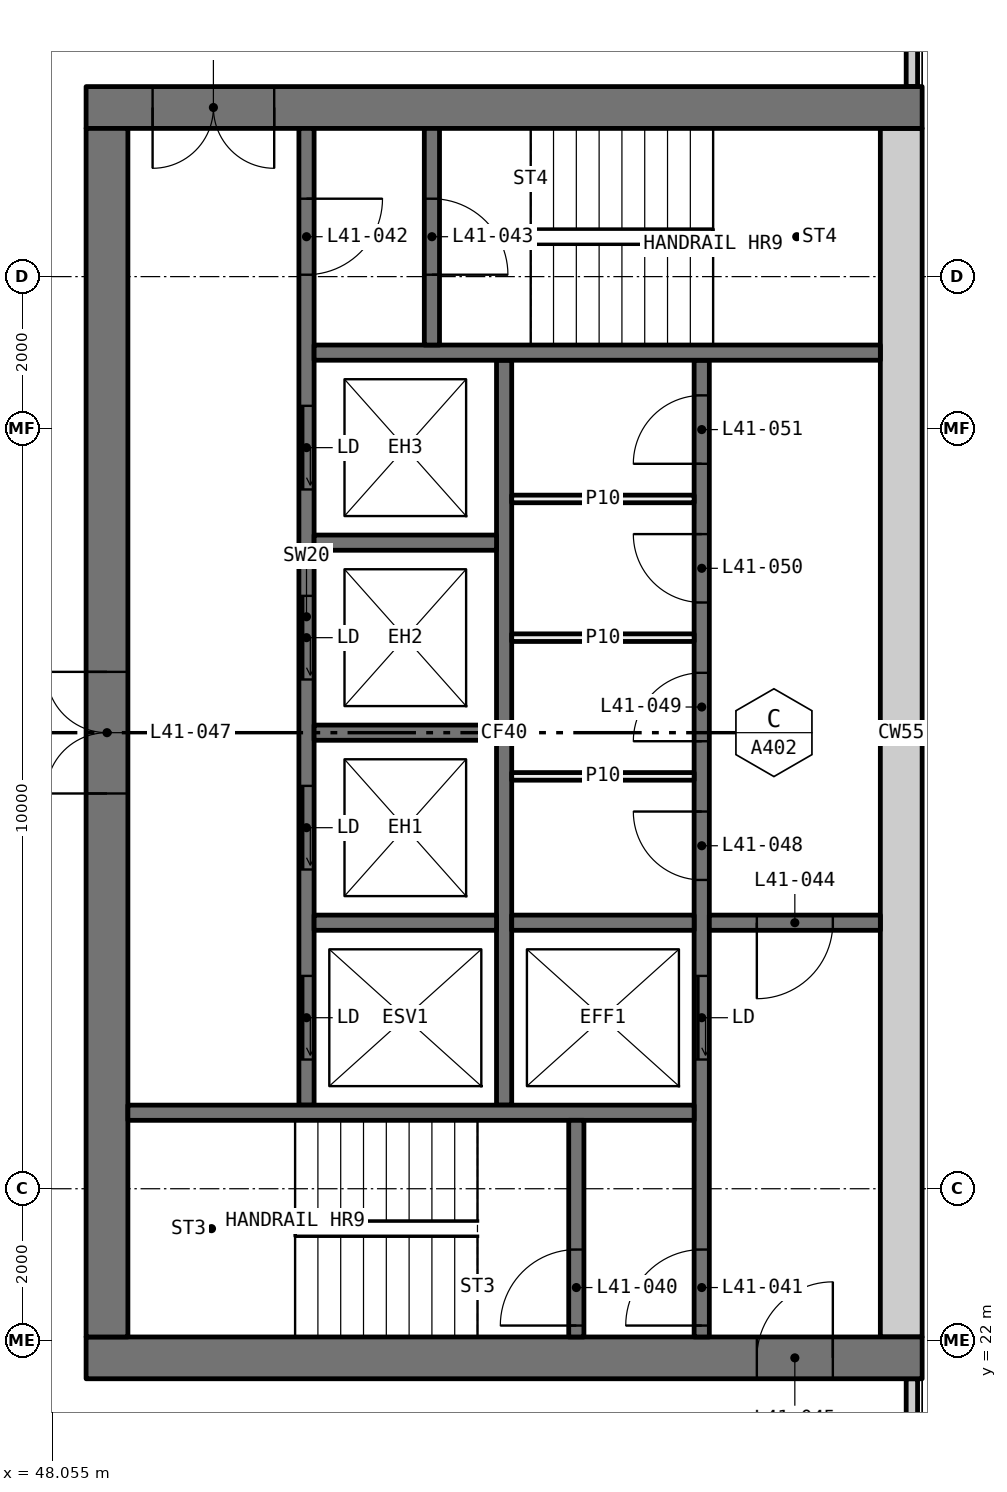
"""IFC4 building model, lengths in metres.
Left out: names, types, materials, properties, quantities, classifications, styles, units other than length and angle.
Written with IfcOpenShell. Run it as: python <this file> out.ifc"""

import sys

from ifc_helpers import new_model, si_unit, direction, frame, frame_2d, origin, place, context, subcontext, project, spatial, rectangle, extrude, element, fill, save


model = new_model("IFC4")
c1 = context("Model", 3, precision=1e-05, world=origin(), true_north=direction((0.0, 1.0)))
c2 = subcontext(c1, "Body", "Model", "MODEL_VIEW")
j1 = project(units=[si_unit("LENGTHUNIT", "METRE"), si_unit("PLANEANGLEUNIT", "RADIAN")], contexts=[c1])
p1 = place(None, origin())
s1 = spatial("IfcSite", under=j1, at=p1, CompositionType="ELEMENT")
p2 = place(p1, origin())
s2 = spatial("IfcBuilding", under=s1, at=p2, CompositionType="ELEMENT")
p3 = place(p2, frame((0.0, 0.0, 158.25)))
s3 = spatial("IfcBuildingStorey", under=s2, at=p3, CompositionType="ELEMENT", Elevation=158.25)
for number, where, z_axis, x_axis in (
    (1, (59.365, 18.71, 0.0), (0.0, 0.0, 1.0), (0.0, 1.0, 0.0)),
    (2, (59.365, 38.5, 0.0), (0.0, 0.0, 1.0), (0.0, 1.0, 0.0)),
):
    element("IfcWall", number, at=place(p3, frame(where, z_axis=z_axis, x_axis=x_axis)), inside=s3, PredefinedType="ELEMENTEDWALL", context=c2, shape_type="SweptSolid", body=[
        extrude(rectangle(XDim=2.79, YDim=0.15, at=frame_2d((1.395, 0.0))), origin(), (0.0, 0.0, 1.0), 3.05),
    ])
p4 = place(p3, frame((59.5, 21.775, 0.0), z_axis=(0.0, 0.0, 1.0), x_axis=(-1.0, 0.0, 0.0)))
e3 = element("IfcWall", 3, at=p4, inside=s3, PredefinedType="SHEAR", context=c2, shape_type="SweptSolid", body=[
    extrude(rectangle(XDim=11.0, YDim=0.55, at=frame_2d((5.5, 0.0))), origin(), (0.0, 0.0, 1.0), 3.05),
])
p5 = place(p4, frame((1.175, 0.0, 0.0)))
e4 = element("IfcOpeningElement", 4, at=p5, cuts=e3, PredefinedType="OPENING", context=c2, shape_type="SweptSolid", body=[
    extrude(rectangle(XDim=1.0, YDim=2.1, at=frame_2d((0.5, 1.05))), frame((0.0, 0.285, 0.0), z_axis=(0.0, -1.0, 0.0), x_axis=(1.0, 0.0, 0.0)), (0.0, 0.0, 1.0), 0.57),
])
p6 = place(p3, frame((59.5, 38.225, 0.0), z_axis=(0.0, 0.0, 1.0), x_axis=(-1.0, 0.0, 0.0)))
e5 = element("IfcWall", 5, at=p6, inside=s3, PredefinedType="SHEAR", context=c2, shape_type="SweptSolid", body=[
    extrude(rectangle(XDim=11.0, YDim=0.55, at=frame_2d((5.5, 0.0))), origin(), (0.0, 0.0, 1.0), 3.05),
])
p7 = place(p6, frame((8.525, 0.0, 0.0)))
e6 = element("IfcOpeningElement", 6, at=p7, cuts=e5, PredefinedType="OPENING", context=c2, shape_type="SweptSolid", body=[
    extrude(rectangle(XDim=1.6, YDim=2.1, at=frame_2d((0.8, 1.05))), frame((0.0, 0.285, 0.0), z_axis=(0.0, -1.0, 0.0), x_axis=(1.0, 0.0, 0.0)), (0.0, 0.0, 1.0), 0.57),
])
p8 = place(p3, frame((59.225, 22.05, 0.0), z_axis=(0.0, 0.0, 1.0), x_axis=(0.0, 1.0, 0.0)))
e7 = element("IfcWall", 7, at=p8, inside=s3, PredefinedType="SHEAR", context=c2, shape_type="SweptSolid", body=[
    extrude(rectangle(XDim=15.9, YDim=0.55, at=frame_2d((7.95, 0.0))), origin(), (0.0, 0.0, 1.0), 3.05),
])
p9 = place(p3, frame((48.775, 22.05, 0.0), z_axis=(0.0, 0.0, 1.0), x_axis=(0.0, 1.0, 0.0)))
e8 = element("IfcWall", 8, at=p9, inside=s3, PredefinedType="SHEAR", context=c2, shape_type="SweptSolid", body=[
    extrude(rectangle(XDim=15.9, YDim=0.55, at=frame_2d((7.95, 0.0))), origin(), (0.0, 0.0, 1.0), 3.05),
])
p10 = place(p9, frame((7.15, 0.0, 0.0)))
e9 = element("IfcOpeningElement", 9, at=p10, cuts=e8, PredefinedType="OPENING", context=c2, shape_type="SweptSolid", body=[
    extrude(rectangle(XDim=1.6, YDim=2.1, at=frame_2d((0.8, 1.05))), frame((0.0, 0.285, 0.0), z_axis=(0.0, -1.0, 0.0), x_axis=(1.0, 0.0, 0.0)), (0.0, 0.0, 1.0), 0.57),
])
p11 = place(p3, frame((56.6, 22.05, 0.0), z_axis=(0.0, 0.0, 1.0), x_axis=(0.0, 1.0, 0.0)))
e10 = element("IfcWall", 10, at=p11, inside=s3, PredefinedType="SOLIDWALL", context=c2, shape_type="SweptSolid", body=[
    extrude(rectangle(XDim=12.85, YDim=0.2, at=frame_2d((6.425, 0.0))), origin(), (0.0, 0.0, 1.0), 3.05),
])
p12 = place(p11, frame((3.65, 0.0, 0.0)))
e11 = element("IfcOpeningElement", 11, at=p12, cuts=e10, PredefinedType="OPENING", context=c2, shape_type="SweptSolid", body=[
    extrude(rectangle(XDim=1.1, YDim=2.1, at=frame_2d((0.55, 1.05))), frame((0.0, 0.11, 0.0), z_axis=(0.0, -1.0, 0.0), x_axis=(1.0, 0.0, 0.0)), (0.0, 0.0, 1.0), 0.22),
])
p13 = place(p11, frame((0.15, 0.0, 0.0)))
e12 = element("IfcOpeningElement", 12, at=p13, cuts=e10, PredefinedType="OPENING", context=c2, shape_type="SweptSolid", body=[
    extrude(rectangle(XDim=1.0, YDim=2.1, at=frame_2d((0.5, 1.05))), frame((0.0, 0.11, 0.0), z_axis=(0.0, -1.0, 0.0), x_axis=(1.0, 0.0, 0.0)), (0.0, 0.0, 1.0), 0.22),
])
p14 = place(p11, frame((6.012, 0.0, 0.0)))
e13 = element("IfcOpeningElement", 13, at=p14, cuts=e10, PredefinedType="OPENING", context=c2, shape_type="SweptSolid", body=[
    extrude(rectangle(XDim=0.9, YDim=2.1, at=frame_2d((0.45, 1.05))), frame((0.0, 0.11, 0.0), z_axis=(0.0, -1.0, 0.0), x_axis=(1.0, 0.0, 0.0)), (0.0, 0.0, 1.0), 0.22),
])
p15 = place(p11, frame((7.837, 0.0, 0.0)))
e14 = element("IfcOpeningElement", 14, at=p15, cuts=e10, PredefinedType="OPENING", context=c2, shape_type="SweptSolid", body=[
    extrude(rectangle(XDim=0.9, YDim=2.1, at=frame_2d((0.45, 1.05))), frame((0.0, 0.11, 0.0), z_axis=(0.0, -1.0, 0.0), x_axis=(1.0, 0.0, 0.0)), (0.0, 0.0, 1.0), 0.22),
])
p16 = place(p11, frame((9.663, 0.0, 0.0)))
e15 = element("IfcOpeningElement", 15, at=p16, cuts=e10, PredefinedType="OPENING", context=c2, shape_type="SweptSolid", body=[
    extrude(rectangle(XDim=0.9, YDim=2.1, at=frame_2d((0.45, 1.05))), frame((0.0, 0.11, 0.0), z_axis=(0.0, -1.0, 0.0), x_axis=(1.0, 0.0, 0.0)), (0.0, 0.0, 1.0), 0.22),
])
p17 = place(p11, frame((11.488, 0.0, 0.0)))
e16 = element("IfcOpeningElement", 16, at=p17, cuts=e10, PredefinedType="OPENING", context=c2, shape_type="SweptSolid", body=[
    extrude(rectangle(XDim=0.9, YDim=2.1, at=frame_2d((0.45, 1.05))), frame((0.0, 0.11, 0.0), z_axis=(0.0, -1.0, 0.0), x_axis=(1.0, 0.0, 0.0)), (0.0, 0.0, 1.0), 0.22),
])
p18 = place(p3, frame((51.4, 25.1, 0.0), z_axis=(0.0, 0.0, 1.0), x_axis=(0.0, 1.0, 0.0)))
e17 = element("IfcWall", 17, at=p18, inside=s3, PredefinedType="SOLIDWALL", context=c2, shape_type="SweptSolid", body=[
    extrude(rectangle(XDim=12.85, YDim=0.2, at=frame_2d((6.425, 0.0))), origin(), (0.0, 0.0, 1.0), 3.05),
])
p19 = place(p18, frame((0.6, 0.0, 0.0)))
e18 = element("IfcOpeningElement", 18, at=p19, cuts=e17, PredefinedType="OPENING", context=c2, shape_type="SweptSolid", body=[
    extrude(rectangle(XDim=1.1, YDim=2.1, at=frame_2d((0.55, 1.05))), frame((0.0, 0.11, 0.0), z_axis=(0.0, -1.0, 0.0), x_axis=(1.0, 0.0, 0.0)), (0.0, 0.0, 1.0), 0.22),
])
p20 = place(p18, frame((3.1, 0.0, 0.0)))
e19 = element("IfcOpeningElement", 19, at=p20, cuts=e17, PredefinedType="OPENING", context=c2, shape_type="SweptSolid", body=[
    extrude(rectangle(XDim=1.1, YDim=2.1, at=frame_2d((0.55, 1.05))), frame((0.0, 0.11, 0.0), z_axis=(0.0, -1.0, 0.0), x_axis=(1.0, 0.0, 0.0)), (0.0, 0.0, 1.0), 0.22),
])
p21 = place(p18, frame((5.6, 0.0, 0.0)))
e20 = element("IfcOpeningElement", 20, at=p21, cuts=e17, PredefinedType="OPENING", context=c2, shape_type="SweptSolid", body=[
    extrude(rectangle(XDim=1.1, YDim=2.1, at=frame_2d((0.55, 1.05))), frame((0.0, 0.11, 0.0), z_axis=(0.0, -1.0, 0.0), x_axis=(1.0, 0.0, 0.0)), (0.0, 0.0, 1.0), 0.22),
])
p22 = place(p18, frame((8.1, 0.0, 0.0)))
e21 = element("IfcOpeningElement", 21, at=p22, cuts=e17, PredefinedType="OPENING", context=c2, shape_type="SweptSolid", body=[
    extrude(rectangle(XDim=1.1, YDim=2.1, at=frame_2d((0.55, 1.05))), frame((0.0, 0.11, 0.0), z_axis=(0.0, -1.0, 0.0), x_axis=(1.0, 0.0, 0.0)), (0.0, 0.0, 1.0), 0.22),
])
p23 = place(p18, frame((10.925, 0.0, 0.0)))
e22 = element("IfcOpeningElement", 22, at=p23, cuts=e17, PredefinedType="OPENING", context=c2, shape_type="SweptSolid", body=[
    extrude(rectangle(XDim=1.0, YDim=2.1, at=frame_2d((0.5, 1.05))), frame((0.0, 0.11, 0.0), z_axis=(0.0, -1.0, 0.0), x_axis=(1.0, 0.0, 0.0)), (0.0, 0.0, 1.0), 0.22),
])
p24 = place(p3, frame((54.0, 25.1, 0.0), z_axis=(0.0, 0.0, 1.0), x_axis=(0.0, 1.0, 0.0)))
e23 = element("IfcWall", 23, at=p24, inside=s3, PredefinedType="SOLIDWALL", context=c2, shape_type="SweptSolid", body=[
    extrude(rectangle(XDim=9.8, YDim=0.2, at=frame_2d((4.9, 0.0))), origin(), (0.0, 0.0, 1.0), 3.05),
])
for number, where, z_axis, x_axis in (
    (24, (56.5, 25.0, 0.0), (0.0, 0.0, 1.0), (-1.0, 0.0, 0.0)),
    (25, (58.95, 35.0, 0.0), (0.0, 0.0, 1.0), (-1.0, 0.0, 0.0)),
):
    element("IfcWall", number, at=place(p3, frame(where, z_axis=z_axis, x_axis=x_axis)), inside=s3, PredefinedType="SOLIDWALL", context=c2, shape_type="SweptSolid", body=[
        extrude(rectangle(XDim=7.45, YDim=0.2, at=frame_2d((3.725, 0.0))), origin(), (0.0, 0.0, 1.0), 3.05),
    ])
p25 = place(p3, frame((58.95, 27.5, 0.0), z_axis=(0.0, 0.0, 1.0), x_axis=(-1.0, 0.0, 0.0)))
e26 = element("IfcWall", 26, at=p25, inside=s3, PredefinedType="SOLIDWALL", context=c2, shape_type="SweptSolid", body=[
    extrude(rectangle(XDim=2.25, YDim=0.2, at=frame_2d((1.125, 0.0))), origin(), (0.0, 0.0, 1.0), 3.05),
])
p26 = place(p25, frame((0.625, 0.0, 0.0)))
e27 = element("IfcOpeningElement", 27, at=p26, cuts=e26, PredefinedType="OPENING", context=c2, shape_type="SweptSolid", body=[
    extrude(rectangle(XDim=1.0, YDim=2.1, at=frame_2d((0.5, 1.05))), frame((0.0, 0.11, 0.0), z_axis=(0.0, -1.0, 0.0), x_axis=(1.0, 0.0, 0.0)), (0.0, 0.0, 1.0), 0.22),
])
p27 = place(p3, frame((54.95, 22.05, 0.0), z_axis=(0.0, 0.0, 1.0), x_axis=(0.0, 1.0, 0.0)))
e28 = element("IfcWall", 28, at=p27, inside=s3, PredefinedType="SOLIDWALL", context=c2, shape_type="SweptSolid", body=[
    extrude(rectangle(XDim=2.85, YDim=0.2, at=frame_2d((1.425, 0.0))), origin(), (0.0, 0.0, 1.0), 3.05),
])
p28 = place(p27, frame((0.15, 0.0, 0.0)))
e29 = element("IfcOpeningElement", 29, at=p28, cuts=e28, PredefinedType="OPENING", context=c2, shape_type="SweptSolid", body=[
    extrude(rectangle(XDim=1.0, YDim=2.1, at=frame_2d((0.5, 1.05))), frame((0.0, 0.11, 0.0), z_axis=(0.0, -1.0, 0.0), x_axis=(1.0, 0.0, 0.0)), (0.0, 0.0, 1.0), 0.22),
])
p29 = place(p3, frame((53.05, 35.1, 0.0), z_axis=(0.0, 0.0, 1.0), x_axis=(0.0, 1.0, 0.0)))
e30 = element("IfcWall", 30, at=p29, inside=s3, PredefinedType="SOLIDWALL", context=c2, shape_type="SweptSolid", body=[
    extrude(rectangle(XDim=2.85, YDim=0.2, at=frame_2d((1.425, 0.0))), origin(), (0.0, 0.0, 1.0), 3.05),
])
p30 = place(p29, frame((0.925, 0.0, 0.0)))
e31 = element("IfcOpeningElement", 31, at=p30, cuts=e30, PredefinedType="OPENING", context=c2, shape_type="SweptSolid", body=[
    extrude(rectangle(XDim=1.0, YDim=2.1, at=frame_2d((0.5, 1.05))), frame((0.0, 0.11, 0.0), z_axis=(0.0, -1.0, 0.0), x_axis=(1.0, 0.0, 0.0)), (0.0, 0.0, 1.0), 0.22),
])
for number, where, z_axis, x_axis in (
    (32, (56.5, 27.5, 0.0), (0.0, 0.0, 1.0), (-1.0, 0.0, 0.0)),
    (33, (53.9, 27.5, 0.0), (0.0, 0.0, 1.0), (-1.0, 0.0, 0.0)),
    (34, (53.9, 30.0, 0.0), (0.0, 0.0, 1.0), (-1.0, 0.0, 0.0)),
    (35, (53.9, 32.5, 0.0), (0.0, 0.0, 1.0), (-1.0, 0.0, 0.0)),
):
    element("IfcWall", number, at=place(p3, frame(where, z_axis=z_axis, x_axis=x_axis)), inside=s3, PredefinedType="SOLIDWALL", context=c2, shape_type="SweptSolid", body=[
        extrude(rectangle(XDim=2.4, YDim=0.2, at=frame_2d((1.2, 0.0))), origin(), (0.0, 0.0, 1.0), 3.05),
    ])
for number, where, z_axis, x_axis in (
    (36, (56.5, 29.425, 0.0), (0.0, 0.0, 1.0), (-1.0, 0.0, 0.0)),
    (37, (56.5, 31.25, 0.0), (0.0, 0.0, 1.0), (-1.0, 0.0, 0.0)),
    (38, (56.5, 33.075, 0.0), (0.0, 0.0, 1.0), (-1.0, 0.0, 0.0)),
):
    element("IfcWall", number, at=place(p3, frame(where, z_axis=z_axis, x_axis=x_axis)), inside=s3, PredefinedType="PARTITIONING", context=c2, shape_type="SweptSolid", body=[
        extrude(rectangle(XDim=2.4, YDim=0.1, at=frame_2d((1.2, 0.0))), origin(), (0.0, 0.0, 1.0), 3.05),
    ])
p31 = place(p19, origin())
e39 = element("IfcDoor", 39, at=p31, inside=s3, OperationType="SLIDING_TO_LEFT", PredefinedType="DOOR", context=c2, shape_type="SweptSolid", body=[
    extrude(rectangle(XDim=1.1, YDim=2.1, at=frame_2d((0.55, 1.05))), frame((0.0, 0.025, 0.0), z_axis=(0.0, -1.0, 0.0), x_axis=(1.0, 0.0, 0.0)), (0.0, 0.0, 1.0), 0.05),
])
fill(e18, e39)
p32 = place(p20, origin())
e40 = element("IfcDoor", 40, at=p32, inside=s3, OperationType="SLIDING_TO_LEFT", PredefinedType="DOOR", context=c2, shape_type="SweptSolid", body=[
    extrude(rectangle(XDim=1.1, YDim=2.1, at=frame_2d((0.55, 1.05))), frame((0.0, 0.025, 0.0), z_axis=(0.0, -1.0, 0.0), x_axis=(1.0, 0.0, 0.0)), (0.0, 0.0, 1.0), 0.05),
])
fill(e19, e40)
p33 = place(p21, origin())
e41 = element("IfcDoor", 41, at=p33, inside=s3, OperationType="SLIDING_TO_LEFT", PredefinedType="DOOR", context=c2, shape_type="SweptSolid", body=[
    extrude(rectangle(XDim=1.1, YDim=2.1, at=frame_2d((0.55, 1.05))), frame((0.0, 0.025, 0.0), z_axis=(0.0, -1.0, 0.0), x_axis=(1.0, 0.0, 0.0)), (0.0, 0.0, 1.0), 0.05),
])
fill(e20, e41)
p34 = place(p22, origin())
e42 = element("IfcDoor", 42, at=p34, inside=s3, OperationType="SLIDING_TO_LEFT", PredefinedType="DOOR", context=c2, shape_type="SweptSolid", body=[
    extrude(rectangle(XDim=1.1, YDim=2.1, at=frame_2d((0.55, 1.05))), frame((0.0, 0.025, 0.0), z_axis=(0.0, -1.0, 0.0), x_axis=(1.0, 0.0, 0.0)), (0.0, 0.0, 1.0), 0.05),
])
fill(e21, e42)
p35 = place(p12, origin())
e43 = element("IfcDoor", 43, at=p35, inside=s3, OperationType="SLIDING_TO_LEFT", PredefinedType="DOOR", context=c2, shape_type="SweptSolid", body=[
    extrude(rectangle(XDim=1.1, YDim=2.1, at=frame_2d((0.55, 1.05))), frame((0.0, 0.025, 0.0), z_axis=(0.0, -1.0, 0.0), x_axis=(1.0, 0.0, 0.0)), (0.0, 0.0, 1.0), 0.05),
])
fill(e11, e43)
p36 = place(p28, origin())
e44 = element("IfcDoor", 44, at=p36, inside=s3, OperationType="SINGLE_SWING_RIGHT", PredefinedType="DOOR", context=c2, shape_type="SweptSolid", body=[
    extrude(rectangle(XDim=1.0, YDim=2.1, at=frame_2d((0.5, 1.05))), frame((0.0, 0.025, 0.0), z_axis=(0.0, -1.0, 0.0), x_axis=(1.0, 0.0, 0.0)), (0.0, 0.0, 1.0), 0.05),
])
fill(e29, e44)
p37 = place(p13, origin())
e45 = element("IfcDoor", 45, at=p37, inside=s3, OperationType="SINGLE_SWING_RIGHT", PredefinedType="DOOR", context=c2, shape_type="SweptSolid", body=[
    extrude(rectangle(XDim=1.0, YDim=2.1, at=frame_2d((0.5, 1.05))), frame((0.0, 0.025, 0.0), z_axis=(0.0, -1.0, 0.0), x_axis=(1.0, 0.0, 0.0)), (0.0, 0.0, 1.0), 0.05),
])
fill(e12, e45)
p38 = place(p23, frame((1.0, 0.0, 0.0), x_axis=(-1.0, 0.0, 0.0)))
e46 = element("IfcDoor", 46, at=p38, inside=s3, OperationType="SINGLE_SWING_RIGHT", PredefinedType="DOOR", context=c2, shape_type="SweptSolid", body=[
    extrude(rectangle(XDim=1.0, YDim=2.1, at=frame_2d((0.5, 1.05))), frame((0.0, 0.025, 0.0), z_axis=(0.0, -1.0, 0.0), x_axis=(1.0, 0.0, 0.0)), (0.0, 0.0, 1.0), 0.05),
])
fill(e22, e46)
p39 = place(p30, frame((1.0, 0.0, 0.0), x_axis=(-1.0, 0.0, 0.0)))
e47 = element("IfcDoor", 47, at=p39, inside=s3, OperationType="SINGLE_SWING_LEFT", PredefinedType="DOOR", context=c2, shape_type="SweptSolid", body=[
    extrude(rectangle(XDim=1.0, YDim=2.1, at=frame_2d((0.5, 1.05))), frame((0.0, 0.025, 0.0), z_axis=(0.0, -1.0, 0.0), x_axis=(1.0, 0.0, 0.0)), (0.0, 0.0, 1.0), 0.05),
])
fill(e31, e47)
p40 = place(p26, origin())
e48 = element("IfcDoor", 48, at=p40, inside=s3, OperationType="SINGLE_SWING_LEFT", PredefinedType="DOOR", context=c2, shape_type="SweptSolid", body=[
    extrude(rectangle(XDim=1.0, YDim=2.1, at=frame_2d((0.5, 1.05))), frame((0.0, 0.025, 0.0), z_axis=(0.0, -1.0, 0.0), x_axis=(1.0, 0.0, 0.0)), (0.0, 0.0, 1.0), 0.05),
])
fill(e27, e48)
p41 = place(p5, frame((1.0, 0.0, 0.0), x_axis=(-1.0, 0.0, 0.0)))
e49 = element("IfcDoor", 49, at=p41, inside=s3, OperationType="SINGLE_SWING_LEFT", PredefinedType="DOOR", context=c2, shape_type="SweptSolid", body=[
    extrude(rectangle(XDim=1.0, YDim=2.1, at=frame_2d((0.5, 1.05))), frame((0.0, 0.025, 0.0), z_axis=(0.0, -1.0, 0.0), x_axis=(1.0, 0.0, 0.0)), (0.0, 0.0, 1.0), 0.05),
])
fill(e4, e49)
p42 = place(p7, origin())
e50 = element("IfcDoor", 50, at=p42, inside=s3, OperationType="DOUBLE_DOOR_SINGLE_SWING", PredefinedType="DOOR", context=c2, shape_type="SweptSolid", body=[
    extrude(rectangle(XDim=1.6, YDim=2.1, at=frame_2d((0.8, 1.05))), frame((0.0, 0.025, 0.0), z_axis=(0.0, -1.0, 0.0), x_axis=(1.0, 0.0, 0.0)), (0.0, 0.0, 1.0), 0.05),
])
fill(e6, e50)
p43 = place(p10, origin())
e51 = element("IfcDoor", 51, at=p43, inside=s3, OperationType="DOUBLE_DOOR_SINGLE_SWING", PredefinedType="DOOR", context=c2, shape_type="SweptSolid", body=[
    extrude(rectangle(XDim=1.6, YDim=2.1, at=frame_2d((0.8, 1.05))), frame((0.0, 0.025, 0.0), z_axis=(0.0, -1.0, 0.0), x_axis=(1.0, 0.0, 0.0)), (0.0, 0.0, 1.0), 0.05),
])
fill(e9, e51)
p44 = place(p14, origin())
e52 = element("IfcDoor", 52, at=p44, inside=s3, OperationType="SINGLE_SWING_LEFT", PredefinedType="DOOR", context=c2, shape_type="SweptSolid", body=[
    extrude(rectangle(XDim=0.9, YDim=2.1, at=frame_2d((0.45, 1.05))), frame((0.0, 0.025, 0.0), z_axis=(0.0, -1.0, 0.0), x_axis=(1.0, 0.0, 0.0)), (0.0, 0.0, 1.0), 0.05),
])
fill(e13, e52)
p45 = place(p15, origin())
e53 = element("IfcDoor", 53, at=p45, inside=s3, OperationType="SINGLE_SWING_RIGHT", PredefinedType="DOOR", context=c2, shape_type="SweptSolid", body=[
    extrude(rectangle(XDim=0.9, YDim=2.1, at=frame_2d((0.45, 1.05))), frame((0.0, 0.025, 0.0), z_axis=(0.0, -1.0, 0.0), x_axis=(1.0, 0.0, 0.0)), (0.0, 0.0, 1.0), 0.05),
])
fill(e14, e53)
p46 = place(p16, origin())
e54 = element("IfcDoor", 54, at=p46, inside=s3, OperationType="SINGLE_SWING_LEFT", PredefinedType="DOOR", context=c2, shape_type="SweptSolid", body=[
    extrude(rectangle(XDim=0.9, YDim=2.1, at=frame_2d((0.45, 1.05))), frame((0.0, 0.025, 0.0), z_axis=(0.0, -1.0, 0.0), x_axis=(1.0, 0.0, 0.0)), (0.0, 0.0, 1.0), 0.05),
])
fill(e15, e54)
p47 = place(p17, origin())
e55 = element("IfcDoor", 55, at=p47, inside=s3, OperationType="SINGLE_SWING_RIGHT", PredefinedType="DOOR", context=c2, shape_type="SweptSolid", body=[
    extrude(rectangle(XDim=0.9, YDim=2.1, at=frame_2d((0.45, 1.05))), frame((0.0, 0.025, 0.0), z_axis=(0.0, -1.0, 0.0), x_axis=(1.0, 0.0, 0.0)), (0.0, 0.0, 1.0), 0.05),
])
fill(e16, e55)
save(model, sys.argv[1])
